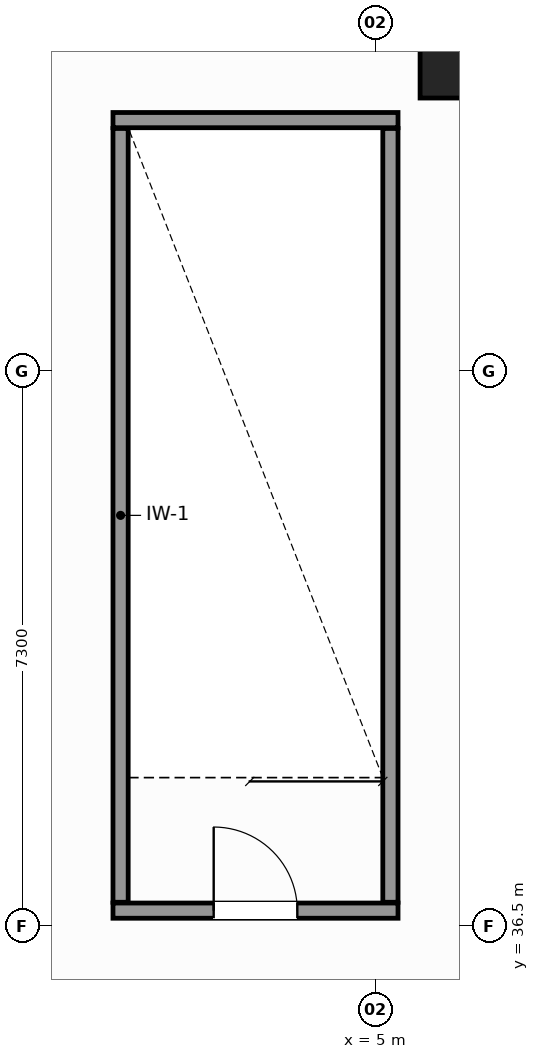
"""IFC4 building model, lengths in metres.
Left out: names, types, materials, properties, quantities, classifications, styles, units other than length and angle.
Written with IfcOpenShell. Run it as: python <this file> out.ifc"""

import sys

from ifc_helpers import new_model, si_unit, direction, frame, frame_2d, origin, origin_2d, place, context, subcontext, project, spatial, rectangle, hollow_circle, extrude, source, transform, mapped, element, fill, save


model = new_model("IFC4")
c1 = context("Model", 3, precision=1e-05, world=origin(), true_north=direction((0.0, 1.0)))
c2 = subcontext(c1, "Body", "Model", "MODEL_VIEW")
j1 = project(units=[si_unit("LENGTHUNIT", "METRE"), si_unit("PLANEANGLEUNIT", "RADIAN")], contexts=[c1])
p1 = place(None, origin())
s1 = spatial("IfcSite", under=j1, at=p1, CompositionType="ELEMENT")
p2 = place(p1, origin())
s2 = spatial("IfcBuilding", under=s1, at=p2, CompositionType="ELEMENT")
p3 = place(p2, frame((0.0, 0.0, 14.4)))
s3 = spatial("IfcBuildingStorey", under=s2, at=p3, CompositionType="ELEMENT", Elevation=14.4)
m1 = source(origin(), c2, "Body", "SweptSolid", [
    extrude(hollow_circle(Radius=0.61, WallThickness=0.05, at=origin_2d()), origin(), (0.0, 0.0, 1.0), 4.4),
])
p4 = place(p3, frame((6.2, 48.0, 0.0), z_axis=(0.0, 0.0, 1.0), x_axis=(1.0, 0.0, 0.0)))
e1 = element("IfcColumn", 1, at=p4, inside=s3, PredefinedType="COLUMN", context=c2, shape_type="MappedRepresentation", body=[
    mapped(m1, transform((0.0, 0.0, 0.0), scale=1.0)),
])
p5 = place(p3, frame((1.55, 36.7, 0.0), z_axis=(0.0, 0.0, 1.0), x_axis=(1.0, 0.0, 0.0)))
e2 = element("IfcWall", 2, at=p5, inside=s3, PredefinedType="SOLIDWALL", context=c2, shape_type="SweptSolid", body=[
    extrude(rectangle(XDim=3.75, YDim=0.2, at=frame_2d((1.875, 0.0))), origin(), (0.0, 0.0, 1.0), 4.4),
])
p6 = place(p5, frame((1.325, 0.0, 0.0)))
e3 = element("IfcOpeningElement", 3, at=p6, cuts=e2, PredefinedType="OPENING", context=c2, shape_type="SweptSolid", body=[
    extrude(rectangle(XDim=1.1, YDim=2.15, at=frame_2d((0.55, 1.075))), frame((0.0, 0.11, 0.0), z_axis=(0.0, -1.0, 0.0), x_axis=(1.0, 0.0, 0.0)), (0.0, 0.0, 1.0), 0.22),
])
p7 = place(p3, frame((1.55, 47.1, 0.0), z_axis=(0.0, 0.0, 1.0), x_axis=(1.0, 0.0, 0.0)))
e4 = element("IfcWall", 4, at=p7, inside=s3, PredefinedType="SOLIDWALL", context=c2, shape_type="SweptSolid", body=[
    extrude(rectangle(XDim=3.75, YDim=0.2, at=frame_2d((1.875, 0.0))), origin(), (0.0, 0.0, 1.0), 4.4),
])
for number, where, z_axis, x_axis in (
    (5, (1.65, 36.81, 0.0), (0.0, 0.0, 1.0), (0.0, 1.0, 0.0)),
    (6, (5.2, 36.81, 0.0), (0.0, 0.0, 1.0), (0.0, 1.0, 0.0)),
):
    element("IfcWall", number, at=place(p3, frame(where, z_axis=z_axis, x_axis=x_axis)), inside=s3, PredefinedType="SOLIDWALL", context=c2, shape_type="SweptSolid", body=[
        extrude(rectangle(XDim=10.18, YDim=0.2, at=frame_2d((5.09, 0.0))), origin(), (0.0, 0.0, 1.0), 4.4),
    ])
m2 = source(origin(), c2, "Body", "SweptSolid", [
    extrude(rectangle(XDim=1.1, YDim=2.15, at=frame_2d((0.55, 1.075))), frame((0.0, 0.025, 0.0), z_axis=(0.0, -1.0, 0.0), x_axis=(1.0, 0.0, 0.0)), (0.0, 0.0, 1.0), 0.05),
])
p8 = place(p6, origin())
e7 = element("IfcDoor", 7, at=p8, inside=s3, OperationType="SINGLE_SWING_LEFT", PredefinedType="DOOR", context=c2, shape_type="MappedRepresentation", body=[
    mapped(m2, transform((0.0, 0.0, 0.0), scale=1.0)),
])
fill(e3, e7)
save(model, sys.argv[1])
